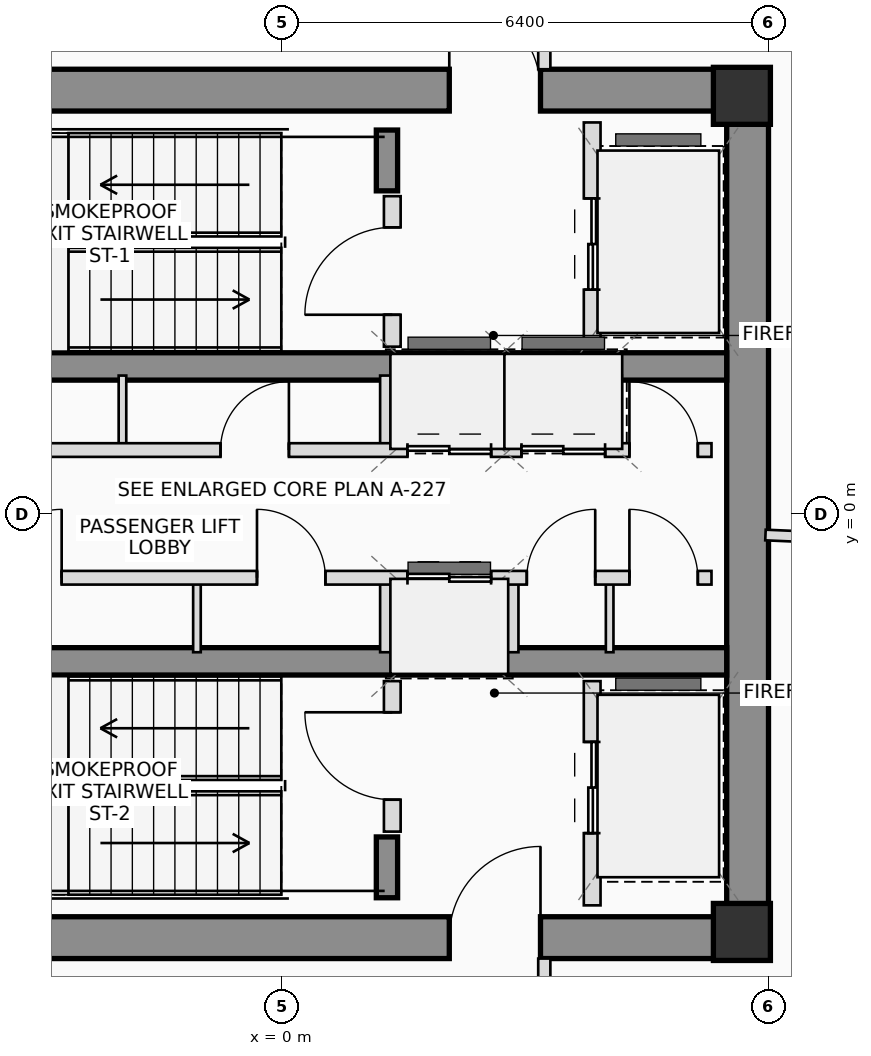
"""IFC4 building model, lengths in metres.
Left out: names, types, materials, properties, quantities, classifications, styles, units other than length and angle.
Written with IfcOpenShell. Run it as: python <this file> out.ifc"""

import sys

from ifc_helpers import new_model, si_unit, direction, frame, frame_2d, origin, origin_2d, place, context, subcontext, project, spatial, rectangle, extrude, source, transform, mapped, element, fill, save


model = new_model("IFC4")
c1 = context("Model", 3, precision=1e-05, world=origin(), true_north=direction((0.0, 1.0)))
c2 = subcontext(c1, "Body", "Model", "MODEL_VIEW")
j1 = project(units=[si_unit("LENGTHUNIT", "METRE"), si_unit("PLANEANGLEUNIT", "RADIAN")], contexts=[c1])
p1 = place(None, origin())
s1 = spatial("IfcSite", under=j1, at=p1, CompositionType="ELEMENT")
p2 = place(p1, origin())
s2 = spatial("IfcBuilding", under=s1, at=p2, CompositionType="ELEMENT")
p3 = place(p2, frame((0.0, 0.0, 293.3)))
s3 = spatial("IfcBuildingStorey", under=s2, at=p3, CompositionType="ELEMENT", Elevation=293.3)
m1 = source(origin(), c2, "Body", "SweptSolid", [
    extrude(rectangle(XDim=0.75, YDim=0.75, at=origin_2d()), origin(), (0.0, 0.0, 1.0), 3.45),
])
for number, where, z_axis, x_axis in (
    (1, (6.05, -5.5, 0.0), (0.0, 0.0, 1.0), (1.0, 0.0, 0.0)),
    (2, (6.05, 5.5, 0.0), (0.0, 0.0, 1.0), (1.0, 0.0, 0.0)),
):
    element("IfcColumn", number, at=place(p3, frame(where, z_axis=z_axis, x_axis=x_axis)), inside=s3, PredefinedType="COLUMN", context=c2, shape_type="MappedRepresentation", body=[
        mapped(m1, transform((0.0, 0.0, 0.0), scale=1.0)),
    ])
p4 = place(p3, frame((-6.4, 5.575, 0.0), z_axis=(0.0, 0.0, 1.0), x_axis=(1.0, 0.0, 0.0)))
e3 = element("IfcWall", 3, at=p4, inside=s3, PredefinedType="SHEAR", context=c2, shape_type="SweptSolid", body=[
    extrude(rectangle(XDim=12.8, YDim=0.55, at=frame_2d((6.4, 0.0))), origin(), (0.0, 0.0, 1.0), 3.45),
])
p5 = place(p4, frame((8.6, 0.0, 0.0)))
e4 = element("IfcOpeningElement", 4, at=p5, cuts=e3, PredefinedType="OPENING", context=c2, shape_type="SweptSolid", body=[
    extrude(rectangle(XDim=1.2, YDim=2.2, at=frame_2d((0.6, 1.1))), frame((0.0, 0.285, 0.0), z_axis=(0.0, -1.0, 0.0), x_axis=(1.0, 0.0, 0.0)), (0.0, 0.0, 1.0), 0.57),
])
p6 = place(p3, frame((-6.4, -5.575, 0.0), z_axis=(0.0, 0.0, 1.0), x_axis=(1.0, 0.0, 0.0)))
e5 = element("IfcWall", 5, at=p6, inside=s3, PredefinedType="SHEAR", context=c2, shape_type="SweptSolid", body=[
    extrude(rectangle(XDim=12.8, YDim=0.55, at=frame_2d((6.4, 0.0))), origin(), (0.0, 0.0, 1.0), 3.45),
])
p7 = place(p6, frame((8.6, 0.0, 0.0)))
e6 = element("IfcOpeningElement", 6, at=p7, cuts=e5, PredefinedType="OPENING", context=c2, shape_type="SweptSolid", body=[
    extrude(rectangle(XDim=1.2, YDim=2.2, at=frame_2d((0.6, 1.1))), frame((0.0, 0.285, 0.0), z_axis=(0.0, -1.0, 0.0), x_axis=(1.0, 0.0, 0.0)), (0.0, 0.0, 1.0), 0.57),
])
p8 = place(p3, frame((6.125, -5.3, 0.0), z_axis=(0.0, 0.0, 1.0), x_axis=(0.0, 1.0, 0.0)))
e7 = element("IfcWall", 7, at=p8, inside=s3, PredefinedType="SHEAR", context=c2, shape_type="SweptSolid", body=[
    extrude(rectangle(XDim=10.6, YDim=0.55, at=frame_2d((5.3, 0.0))), origin(), (0.0, 0.0, 1.0), 3.45),
])
for number, where, z_axis, x_axis in (
    (8, (-5.85, 1.94, 0.0), (0.0, 0.0, 1.0), (1.0, 0.0, 0.0)),
    (9, (-5.85, -1.94, 0.0), (0.0, 0.0, 1.0), (1.0, 0.0, 0.0)),
):
    element("IfcWall", number, at=place(p3, frame(where, z_axis=z_axis, x_axis=x_axis)), inside=s3, PredefinedType="SHEAR", context=c2, shape_type="SweptSolid", body=[
        extrude(rectangle(XDim=11.7, YDim=0.36, at=frame_2d((5.85, 0.0))), origin(), (0.0, 0.0, 1.0), 3.45),
    ])
for number, where, z_axis, x_axis in (
    (10, (1.38, 4.25, 0.0), (0.0, 0.0, 1.0), (0.0, 1.0, 0.0)),
    (11, (1.38, -5.05, 0.0), (0.0, 0.0, 1.0), (0.0, 1.0, 0.0)),
):
    element("IfcWall", number, at=place(p3, frame(where, z_axis=z_axis, x_axis=x_axis)), inside=s3, PredefinedType="SHEAR", context=c2, shape_type="SweptSolid", body=[
        extrude(rectangle(XDim=0.8, YDim=0.28, at=frame_2d((0.4, 0.0))), origin(), (0.0, 0.0, 1.0), 3.45),
    ])
p9 = place(p3, frame((1.45, 2.2, 0.0), z_axis=(0.0, 0.0, 1.0), x_axis=(0.0, 1.0, 0.0)))
e12 = element("IfcWall", 12, at=p9, inside=s3, PredefinedType="PLUMBINGWALL", context=c2, shape_type="SweptSolid", body=[
    extrude(rectangle(XDim=1.98, YDim=0.22, at=frame_2d((0.99, 0.0))), origin(), (0.0, 0.0, 1.0), 3.25),
])
p10 = place(p9, frame((0.42, 0.0, 0.0)))
e13 = element("IfcOpeningElement", 13, at=p10, cuts=e12, PredefinedType="OPENING", context=c2, shape_type="SweptSolid", body=[
    extrude(rectangle(XDim=1.15, YDim=2.15, at=frame_2d((0.575, 1.075))), frame((0.0, 0.12, 0.0), z_axis=(0.0, -1.0, 0.0), x_axis=(1.0, 0.0, 0.0)), (0.0, 0.0, 1.0), 0.24),
])
p11 = place(p3, frame((4.08, 2.2, 0.0), z_axis=(0.0, 0.0, 1.0), x_axis=(0.0, 1.0, 0.0)))
e14 = element("IfcWall", 14, at=p11, inside=s3, PredefinedType="PLUMBINGWALL", context=c2, shape_type="SweptSolid", body=[
    extrude(rectangle(XDim=2.95, YDim=0.22, at=frame_2d((1.475, 0.0))), origin(), (0.0, 0.0, 1.0), 3.25),
])
p12 = place(p11, frame((0.75, 0.0, 0.0)))
e15 = element("IfcOpeningElement", 15, at=p12, cuts=e14, PredefinedType="OPENING", context=c2, shape_type="SweptSolid", body=[
    extrude(rectangle(XDim=1.2, YDim=2.25, at=frame_2d((0.6, 1.125))), frame((0.0, 0.12, 0.0), z_axis=(0.0, -1.0, 0.0), x_axis=(1.0, 0.0, 0.0)), (0.0, 0.0, 1.0), 0.24),
])
p13 = place(p3, frame((1.45, -4.18, 0.0), z_axis=(0.0, 0.0, 1.0), x_axis=(0.0, 1.0, 0.0)))
e16 = element("IfcWall", 16, at=p13, inside=s3, PredefinedType="PLUMBINGWALL", context=c2, shape_type="SweptSolid", body=[
    extrude(rectangle(XDim=1.98, YDim=0.22, at=frame_2d((0.99, 0.0))), origin(), (0.0, 0.0, 1.0), 3.25),
])
p14 = place(p13, frame((0.42, 0.0, 0.0)))
e17 = element("IfcOpeningElement", 17, at=p14, cuts=e16, PredefinedType="OPENING", context=c2, shape_type="SweptSolid", body=[
    extrude(rectangle(XDim=1.15, YDim=2.15, at=frame_2d((0.575, 1.075))), frame((0.0, 0.12, 0.0), z_axis=(0.0, -1.0, 0.0), x_axis=(1.0, 0.0, 0.0)), (0.0, 0.0, 1.0), 0.24),
])
p15 = place(p3, frame((4.08, -5.15, 0.0), z_axis=(0.0, 0.0, 1.0), x_axis=(0.0, 1.0, 0.0)))
e18 = element("IfcWall", 18, at=p15, inside=s3, PredefinedType="PLUMBINGWALL", context=c2, shape_type="SweptSolid", body=[
    extrude(rectangle(XDim=2.95, YDim=0.22, at=frame_2d((1.475, 0.0))), origin(), (0.0, 0.0, 1.0), 3.25),
])
p16 = place(p15, frame((0.95, 0.0, 0.0)))
e19 = element("IfcOpeningElement", 19, at=p16, cuts=e18, PredefinedType="OPENING", context=c2, shape_type="SweptSolid", body=[
    extrude(rectangle(XDim=1.2, YDim=2.25, at=frame_2d((0.6, 1.125))), frame((0.0, 0.12, 0.0), z_axis=(0.0, -1.0, 0.0), x_axis=(1.0, 0.0, 0.0)), (0.0, 0.0, 1.0), 0.24),
])
for number, where, z_axis, x_axis in (
    (20, (-2.1, 0.84, 0.0), (0.0, 0.0, 1.0), (0.0, 1.0, 0.0)),
    (21, (-1.12, -1.82, 0.0), (0.0, 0.0, 1.0), (0.0, 1.0, 0.0)),
):
    element("IfcWall", number, at=place(p3, frame(where, z_axis=z_axis, x_axis=x_axis)), inside=s3, PredefinedType="PARTITIONING", context=c2, shape_type="SweptSolid", body=[
        extrude(rectangle(XDim=0.98, YDim=0.1, at=frame_2d((0.49, 0.0))), origin(), (0.0, 0.0, 1.0), 3.25),
    ])
for number, where, z_axis, x_axis in (
    (22, (1.38, 0.84, 0.0), (0.0, 0.0, 1.0), (0.0, 1.0, 0.0)),
    (23, (1.38, -1.82, 0.0), (0.0, 0.0, 1.0), (0.0, 1.0, 0.0)),
    (24, (3.02, 0.84, 0.0), (0.0, 0.0, 1.0), (0.0, 1.0, 0.0)),
    (25, (4.38, 0.84, 0.0), (0.0, 0.0, 1.0), (0.0, 1.0, 0.0)),
    (26, (3.02, -1.82, 0.0), (0.0, 0.0, 1.0), (0.0, 1.0, 0.0)),
):
    element("IfcWall", number, at=place(p3, frame(where, z_axis=z_axis, x_axis=x_axis)), inside=s3, PredefinedType="PLUMBINGWALL", context=c2, shape_type="SweptSolid", body=[
        extrude(rectangle(XDim=0.98, YDim=0.18, at=frame_2d((0.49, 0.0))), origin(), (0.0, 0.0, 1.0), 3.25),
    ])
p17 = place(p3, frame((4.31, -1.82, 0.0), z_axis=(0.0, 0.0, 1.0), x_axis=(0.0, 1.0, 0.0)))
e27 = element("IfcWall", 27, at=p17, inside=s3, PredefinedType="PARTITIONING", context=c2, shape_type="SweptSolid", body=[
    extrude(rectangle(XDim=0.98, YDim=0.1, at=frame_2d((0.49, 0.0))), origin(), (0.0, 0.0, 1.0), 3.25),
])
p18 = place(p3, frame((-5.68, 0.84, 0.0), z_axis=(0.0, 0.0, 1.0), x_axis=(1.0, 0.0, 0.0)))
e28 = element("IfcWall", 28, at=p18, inside=s3, PredefinedType="PLUMBINGWALL", context=c2, shape_type="SweptSolid", body=[
    extrude(rectangle(XDim=11.33, YDim=0.18, at=frame_2d((5.665, 0.0))), origin(), (0.0, 0.0, 1.0), 3.25),
])
p19 = place(p18, frame((1.39, 0.0, 0.0)))
e29 = element("IfcOpeningElement", 29, at=p19, cuts=e28, PredefinedType="OPENING", context=c2, shape_type="SweptSolid", body=[
    extrude(rectangle(XDim=0.92, YDim=2.1, at=frame_2d((0.46, 1.05))), frame((0.0, 0.1, 0.0), z_axis=(0.0, -1.0, 0.0), x_axis=(1.0, 0.0, 0.0)), (0.0, 0.0, 1.0), 0.2),
])
p20 = place(p18, frame((4.87, 0.0, 0.0)))
e30 = element("IfcOpeningElement", 30, at=p20, cuts=e28, PredefinedType="OPENING", context=c2, shape_type="SweptSolid", body=[
    extrude(rectangle(XDim=0.9, YDim=2.05, at=frame_2d((0.45, 1.025))), frame((0.0, 0.1, 0.0), z_axis=(0.0, -1.0, 0.0), x_axis=(1.0, 0.0, 0.0)), (0.0, 0.0, 1.0), 0.2),
])
p21 = place(p18, frame((7.33, 0.0, 0.0)))
e31 = element("IfcOpeningElement", 31, at=p21, cuts=e28, PredefinedType="OPENING", context=c2, shape_type="SweptSolid", body=[
    extrude(rectangle(XDim=1.1, YDim=2.2, at=frame_2d((0.55, 1.1))), frame((0.0, 0.1, 0.0), z_axis=(0.0, -1.0, 0.0), x_axis=(1.0, 0.0, 0.0)), (0.0, 0.0, 1.0), 0.2),
])
p22 = place(p18, frame((8.83, 0.0, 0.0)))
e32 = element("IfcOpeningElement", 32, at=p22, cuts=e28, PredefinedType="OPENING", context=c2, shape_type="SweptSolid", body=[
    extrude(rectangle(XDim=1.1, YDim=2.2, at=frame_2d((0.55, 1.1))), frame((0.0, 0.1, 0.0), z_axis=(0.0, -1.0, 0.0), x_axis=(1.0, 0.0, 0.0)), (0.0, 0.0, 1.0), 0.2),
])
p23 = place(p18, frame((10.25, 0.0, 0.0)))
e33 = element("IfcOpeningElement", 33, at=p23, cuts=e28, PredefinedType="OPENING", context=c2, shape_type="SweptSolid", body=[
    extrude(rectangle(XDim=0.9, YDim=2.05, at=frame_2d((0.45, 1.025))), frame((0.0, 0.1, 0.0), z_axis=(0.0, -1.0, 0.0), x_axis=(1.0, 0.0, 0.0)), (0.0, 0.0, 1.0), 0.2),
])
p24 = place(p3, frame((-5.68, -0.84, 0.0), z_axis=(0.0, 0.0, 1.0), x_axis=(1.0, 0.0, 0.0)))
e34 = element("IfcWall", 34, at=p24, inside=s3, PredefinedType="PLUMBINGWALL", context=c2, shape_type="SweptSolid", body=[
    extrude(rectangle(XDim=11.33, YDim=0.18, at=frame_2d((5.665, 0.0))), origin(), (0.0, 0.0, 1.0), 3.25),
])
p25 = place(p24, frame((1.88, 0.0, 0.0)))
e35 = element("IfcOpeningElement", 35, at=p25, cuts=e34, PredefinedType="OPENING", context=c2, shape_type="SweptSolid", body=[
    extrude(rectangle(XDim=0.9, YDim=2.05, at=frame_2d((0.45, 1.025))), frame((0.0, 0.1, 0.0), z_axis=(0.0, -1.0, 0.0), x_axis=(1.0, 0.0, 0.0)), (0.0, 0.0, 1.0), 0.2),
])
p26 = place(p24, frame((5.35, 0.0, 0.0)))
e36 = element("IfcOpeningElement", 36, at=p26, cuts=e34, PredefinedType="OPENING", context=c2, shape_type="SweptSolid", body=[
    extrude(rectangle(XDim=0.9, YDim=2.05, at=frame_2d((0.45, 1.025))), frame((0.0, 0.1, 0.0), z_axis=(0.0, -1.0, 0.0), x_axis=(1.0, 0.0, 0.0)), (0.0, 0.0, 1.0), 0.2),
])
p27 = place(p24, frame((7.33, 0.0, 0.0)))
e37 = element("IfcOpeningElement", 37, at=p27, cuts=e34, PredefinedType="OPENING", context=c2, shape_type="SweptSolid", body=[
    extrude(rectangle(XDim=1.1, YDim=2.2, at=frame_2d((0.55, 1.1))), frame((0.0, 0.1, 0.0), z_axis=(0.0, -1.0, 0.0), x_axis=(1.0, 0.0, 0.0)), (0.0, 0.0, 1.0), 0.2),
])
p28 = place(p24, frame((8.9, 0.0, 0.0)))
e38 = element("IfcOpeningElement", 38, at=p28, cuts=e34, PredefinedType="OPENING", context=c2, shape_type="SweptSolid", body=[
    extrude(rectangle(XDim=0.9, YDim=2.05, at=frame_2d((0.45, 1.025))), frame((0.0, 0.1, 0.0), z_axis=(0.0, -1.0, 0.0), x_axis=(1.0, 0.0, 0.0)), (0.0, 0.0, 1.0), 0.2),
])
p29 = place(p24, frame((10.25, 0.0, 0.0)))
e39 = element("IfcOpeningElement", 39, at=p29, cuts=e34, PredefinedType="OPENING", context=c2, shape_type="SweptSolid", body=[
    extrude(rectangle(XDim=0.9, YDim=2.05, at=frame_2d((0.45, 1.025))), frame((0.0, 0.1, 0.0), z_axis=(0.0, -1.0, 0.0), x_axis=(1.0, 0.0, 0.0)), (0.0, 0.0, 1.0), 0.2),
])
p30 = place(p3, frame((3.45, 7.425, 0.0), z_axis=(0.0, 0.0, 1.0), x_axis=(0.0, -1.0, 0.0)))
e40 = element("IfcWall", 40, at=p30, inside=s3, PredefinedType="PARTITIONING", context=c2, shape_type="SweptSolid", body=[
    extrude(rectangle(XDim=1.575, YDim=0.16, at=frame_2d((0.787, 0.0))), origin(), (0.0, 0.0, 1.0), 2.855),
])
p31 = place(p30, frame((0.287, 0.0, 0.0)))
e41 = element("IfcOpeningElement", 41, at=p31, cuts=e40, PredefinedType="OPENING", context=c2, shape_type="SweptSolid", body=[
    extrude(rectangle(XDim=1.0, YDim=2.25, at=frame_2d((0.5, 1.125))), frame((0.0, 0.09, 0.0), z_axis=(0.0, -1.0, 0.0), x_axis=(1.0, 0.0, 0.0)), (0.0, 0.0, 1.0), 0.18),
])
p32 = place(p3, frame((3.45, -5.85, 0.0), z_axis=(0.0, 0.0, 1.0), x_axis=(0.0, -1.0, 0.0)))
e42 = element("IfcWall", 42, at=p32, inside=s3, PredefinedType="PARTITIONING", context=c2, shape_type="SweptSolid", body=[
    extrude(rectangle(XDim=1.575, YDim=0.16, at=frame_2d((0.787, 0.0))), origin(), (0.0, 0.0, 1.0), 2.855),
])
p33 = place(p32, frame((0.287, 0.0, 0.0)))
e43 = element("IfcOpeningElement", 43, at=p33, cuts=e42, PredefinedType="OPENING", context=c2, shape_type="SweptSolid", body=[
    extrude(rectangle(XDim=1.0, YDim=2.25, at=frame_2d((0.5, 1.125))), frame((0.0, 0.09, 0.0), z_axis=(0.0, -1.0, 0.0), x_axis=(1.0, 0.0, 0.0)), (0.0, 0.0, 1.0), 0.18),
])
p34 = place(p3, frame((6.36, -0.278, 0.0), z_axis=(0.0, 0.0, 1.0), x_axis=(0.999047623791, -0.043633076864, 0.0)))
e44 = element("IfcWall", 44, at=p34, inside=s3, PredefinedType="PARTITIONING", context=c2, shape_type="SweptSolid", body=[
    extrude(rectangle(XDim=13.524, YDim=0.14, at=frame_2d((6.762, 0.0))), origin(), (0.0, 0.0, 1.0), 2.815),
])
p35 = place(p5, origin())
e45 = element("IfcDoor", 45, at=p35, inside=s3, OperationType="SINGLE_SWING_LEFT", PredefinedType="DOOR", context=c2, shape_type="SweptSolid", body=[
    extrude(rectangle(XDim=1.2, YDim=2.2, at=frame_2d((0.6, 1.1))), frame((0.0, 0.025, 0.0), z_axis=(0.0, -1.0, 0.0), x_axis=(1.0, 0.0, 0.0)), (0.0, 0.0, 1.0), 0.05),
])
fill(e4, e45)
p36 = place(p7, origin())
e46 = element("IfcDoor", 46, at=p36, inside=s3, OperationType="SINGLE_SWING_RIGHT", PredefinedType="DOOR", context=c2, shape_type="SweptSolid", body=[
    extrude(rectangle(XDim=1.2, YDim=2.2, at=frame_2d((0.6, 1.1))), frame((0.0, 0.025, 0.0), z_axis=(0.0, -1.0, 0.0), x_axis=(1.0, 0.0, 0.0)), (0.0, 0.0, 1.0), 0.05),
])
fill(e6, e46)
p37 = place(p10, origin())
e47 = element("IfcDoor", 47, at=p37, inside=s3, OperationType="SINGLE_SWING_LEFT", PredefinedType="DOOR", context=c2, shape_type="SweptSolid", body=[
    extrude(rectangle(XDim=1.15, YDim=2.15, at=frame_2d((0.575, 1.075))), frame((0.0, 0.025, 0.0), z_axis=(0.0, -1.0, 0.0), x_axis=(1.0, 0.0, 0.0)), (0.0, 0.0, 1.0), 0.05),
])
fill(e13, e47)
p38 = place(p12, origin())
e48 = element("IfcDoor", 48, at=p38, inside=s3, OperationType="DOUBLE_DOOR_SLIDING", PredefinedType="DOOR", context=c2, shape_type="SweptSolid", body=[
    extrude(rectangle(XDim=1.2, YDim=2.25, at=frame_2d((0.6, 1.125))), frame((0.0, 0.025, 0.0), z_axis=(0.0, -1.0, 0.0), x_axis=(1.0, 0.0, 0.0)), (0.0, 0.0, 1.0), 0.05),
])
fill(e15, e48)
p39 = place(p14, origin())
e49 = element("IfcDoor", 49, at=p39, inside=s3, OperationType="SINGLE_SWING_RIGHT", PredefinedType="DOOR", context=c2, shape_type="SweptSolid", body=[
    extrude(rectangle(XDim=1.15, YDim=2.15, at=frame_2d((0.575, 1.075))), frame((0.0, 0.025, 0.0), z_axis=(0.0, -1.0, 0.0), x_axis=(1.0, 0.0, 0.0)), (0.0, 0.0, 1.0), 0.05),
])
fill(e17, e49)
p40 = place(p16, origin())
e50 = element("IfcDoor", 50, at=p40, inside=s3, OperationType="DOUBLE_DOOR_SLIDING", PredefinedType="DOOR", context=c2, shape_type="SweptSolid", body=[
    extrude(rectangle(XDim=1.2, YDim=2.25, at=frame_2d((0.6, 1.125))), frame((0.0, 0.025, 0.0), z_axis=(0.0, -1.0, 0.0), x_axis=(1.0, 0.0, 0.0)), (0.0, 0.0, 1.0), 0.05),
])
fill(e19, e50)
p41 = place(p20, origin())
e51 = element("IfcDoor", 51, at=p41, inside=s3, OperationType="SINGLE_SWING_RIGHT", PredefinedType="DOOR", context=c2, shape_type="SweptSolid", body=[
    extrude(rectangle(XDim=0.9, YDim=2.05, at=frame_2d((0.45, 1.025))), frame((0.0, 0.025, 0.0), z_axis=(0.0, -1.0, 0.0), x_axis=(1.0, 0.0, 0.0)), (0.0, 0.0, 1.0), 0.05),
])
fill(e30, e51)
p42 = place(p21, origin())
e52 = element("IfcDoor", 52, at=p42, inside=s3, OperationType="DOUBLE_DOOR_SLIDING", PredefinedType="DOOR", context=c2, shape_type="SweptSolid", body=[
    extrude(rectangle(XDim=1.1, YDim=2.2, at=frame_2d((0.55, 1.1))), frame((0.0, 0.025, 0.0), z_axis=(0.0, -1.0, 0.0), x_axis=(1.0, 0.0, 0.0)), (0.0, 0.0, 1.0), 0.05),
])
fill(e31, e52)
p43 = place(p22, origin())
e53 = element("IfcDoor", 53, at=p43, inside=s3, OperationType="DOUBLE_DOOR_SLIDING", PredefinedType="DOOR", context=c2, shape_type="SweptSolid", body=[
    extrude(rectangle(XDim=1.1, YDim=2.2, at=frame_2d((0.55, 1.1))), frame((0.0, 0.025, 0.0), z_axis=(0.0, -1.0, 0.0), x_axis=(1.0, 0.0, 0.0)), (0.0, 0.0, 1.0), 0.05),
])
fill(e32, e53)
p44 = place(p23, origin())
e54 = element("IfcDoor", 54, at=p44, inside=s3, OperationType="SINGLE_SWING_LEFT", PredefinedType="DOOR", context=c2, shape_type="SweptSolid", body=[
    extrude(rectangle(XDim=0.9, YDim=2.05, at=frame_2d((0.45, 1.025))), frame((0.0, 0.025, 0.0), z_axis=(0.0, -1.0, 0.0), x_axis=(1.0, 0.0, 0.0)), (0.0, 0.0, 1.0), 0.05),
])
fill(e33, e54)
p45 = place(p25, origin())
e55 = element("IfcDoor", 55, at=p45, inside=s3, OperationType="SINGLE_SWING_RIGHT", PredefinedType="DOOR", context=c2, shape_type="SweptSolid", body=[
    extrude(rectangle(XDim=0.9, YDim=2.05, at=frame_2d((0.45, 1.025))), frame((0.0, 0.025, 0.0), z_axis=(0.0, -1.0, 0.0), x_axis=(1.0, 0.0, 0.0)), (0.0, 0.0, 1.0), 0.05),
])
fill(e35, e55)
p46 = place(p26, origin())
e56 = element("IfcDoor", 56, at=p46, inside=s3, OperationType="SINGLE_SWING_LEFT", PredefinedType="DOOR", context=c2, shape_type="SweptSolid", body=[
    extrude(rectangle(XDim=0.9, YDim=2.05, at=frame_2d((0.45, 1.025))), frame((0.0, 0.025, 0.0), z_axis=(0.0, -1.0, 0.0), x_axis=(1.0, 0.0, 0.0)), (0.0, 0.0, 1.0), 0.05),
])
fill(e36, e56)
p47 = place(p27, origin())
e57 = element("IfcDoor", 57, at=p47, inside=s3, OperationType="DOUBLE_DOOR_SLIDING", PredefinedType="DOOR", context=c2, shape_type="SweptSolid", body=[
    extrude(rectangle(XDim=1.1, YDim=2.2, at=frame_2d((0.55, 1.1))), frame((0.0, 0.025, 0.0), z_axis=(0.0, -1.0, 0.0), x_axis=(1.0, 0.0, 0.0)), (0.0, 0.0, 1.0), 0.05),
])
fill(e37, e57)
p48 = place(p28, origin())
e58 = element("IfcDoor", 58, at=p48, inside=s3, OperationType="SINGLE_SWING_RIGHT", PredefinedType="DOOR", context=c2, shape_type="SweptSolid", body=[
    extrude(rectangle(XDim=0.9, YDim=2.05, at=frame_2d((0.45, 1.025))), frame((0.0, 0.025, 0.0), z_axis=(0.0, -1.0, 0.0), x_axis=(1.0, 0.0, 0.0)), (0.0, 0.0, 1.0), 0.05),
])
fill(e38, e58)
p49 = place(p29, origin())
e59 = element("IfcDoor", 59, at=p49, inside=s3, OperationType="SINGLE_SWING_LEFT", PredefinedType="DOOR", context=c2, shape_type="SweptSolid", body=[
    extrude(rectangle(XDim=0.9, YDim=2.05, at=frame_2d((0.45, 1.025))), frame((0.0, 0.025, 0.0), z_axis=(0.0, -1.0, 0.0), x_axis=(1.0, 0.0, 0.0)), (0.0, 0.0, 1.0), 0.05),
])
fill(e39, e59)
save(model, sys.argv[1])
